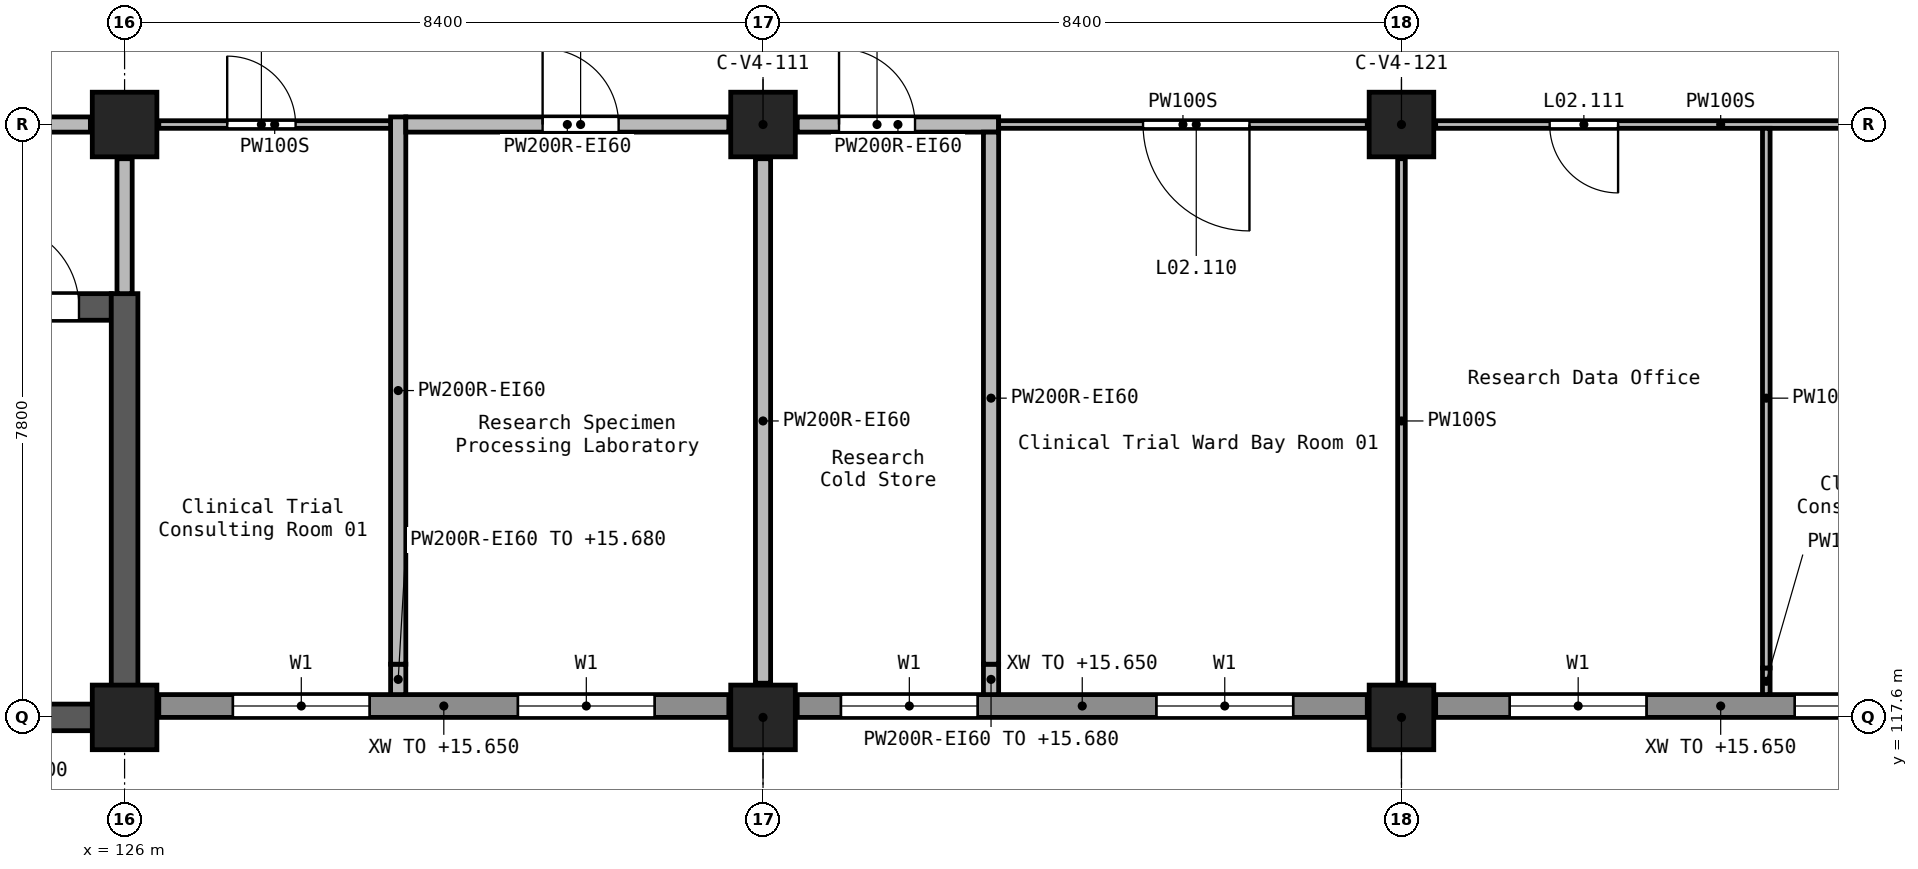
"""IFC4 building model, lengths in metres.
Left out: names, types, materials, properties, quantities, classifications, styles, units other than length and angle.
Written with IfcOpenShell. Run it as: python <this file> out.ifc"""

import sys

from ifc_helpers import new_model, si_unit, direction, frame, frame_2d, origin, origin_2d, place, context, subcontext, project, spatial, rectangle, extrude, element, fill, save


model = new_model("IFC4")
c1 = context("Model", 3, precision=1e-05, world=origin(), true_north=direction((0.0, 1.0)))
c2 = subcontext(c1, "Body", "Model", "MODEL_VIEW")
j1 = project(units=[si_unit("LENGTHUNIT", "METRE"), si_unit("PLANEANGLEUNIT", "RADIAN")], contexts=[c1])
p1 = place(None, origin())
s1 = spatial("IfcSite", under=j1, at=p1, CompositionType="ELEMENT")
p2 = place(p1, origin())
s2 = spatial("IfcBuilding", under=s1, at=p2, CompositionType="ELEMENT")
p3 = place(p2, frame((0.0, 0.0, 12.6)))
s3 = spatial("IfcBuildingStorey", under=s2, at=p3, CompositionType="ELEMENT", Elevation=12.6)
for number, where, z_axis, x_axis in (
    (1, (126.0, 117.6, 0.0), (0.0, 0.0, 1.0), (1.0, 0.0, 0.0)),
    (2, (126.0, 125.4, 0.0), (0.0, 0.0, 1.0), (1.0, 0.0, 0.0)),
    (3, (134.4, 117.6, 0.0), (0.0, 0.0, 1.0), (1.0, 0.0, 0.0)),
    (4, (134.4, 125.4, 0.0), (0.0, 0.0, 1.0), (1.0, 0.0, 0.0)),
    (5, (142.8, 117.6, 0.0), (0.0, 0.0, 1.0), (1.0, 0.0, 0.0)),
    (6, (142.8, 125.4, 0.0), (0.0, 0.0, 1.0), (1.0, 0.0, 0.0)),
):
    element("IfcColumn", number, at=place(p3, frame(where, z_axis=z_axis, x_axis=x_axis)), inside=s3, PredefinedType="COLUMN", context=c2, shape_type="SweptSolid", body=[
        extrude(rectangle(XDim=0.85, YDim=0.85, at=origin_2d()), origin(), (0.0, 0.0, 1.0), 4.2),
    ])
p4 = place(p3, frame((117.425, 123.0, 0.0), z_axis=(0.0, 0.0, 1.0), x_axis=(1.0, 0.0, 0.0)))
e7 = element("IfcWall", 7, at=p4, inside=s3, PredefinedType="SHEAR", context=c2, shape_type="SweptSolid", body=[
    extrude(rectangle(XDim=8.4, YDim=0.35, at=frame_2d((4.2, 0.0))), origin(), (0.0, 0.0, 1.0), 4.2),
])
p5 = place(p4, frame((6.875, 0.0, 0.0)))
e8 = element("IfcOpeningElement", 8, at=p5, cuts=e7, PredefinedType="OPENING", context=c2, shape_type="SweptSolid", body=[
    extrude(rectangle(XDim=1.1, YDim=2.1, at=frame_2d((0.55, 1.05))), frame((0.0, 0.185, 0.0), z_axis=(0.0, -1.0, 0.0), x_axis=(1.0, 0.0, 0.0)), (0.0, 0.0, 1.0), 0.37),
])
p6 = place(p3, frame((117.775, 117.6, 0.0), z_axis=(0.0, 0.0, 1.0), x_axis=(1.0, 0.0, 0.0)))
e9 = element("IfcWall", 9, at=p6, inside=s3, PredefinedType="SHEAR", context=c2, shape_type="SweptSolid", body=[
    extrude(rectangle(XDim=8.05, YDim=0.35, at=frame_2d((4.025, 0.0))), origin(), (0.0, 0.0, 1.0), 4.2),
])
p7 = place(p3, frame((126.0, 117.425, 0.0), z_axis=(0.0, 0.0, 1.0), x_axis=(0.0, 1.0, 0.0)))
e10 = element("IfcWall", 10, at=p7, inside=s3, PredefinedType="SHEAR", context=c2, shape_type="SweptSolid", body=[
    extrude(rectangle(XDim=5.75, YDim=0.35, at=frame_2d((2.875, 0.0))), origin(), (0.0, 0.0, 1.0), 4.2),
])
p8 = place(p3, frame((126.45, 117.75, 0.0), z_axis=(0.0, 0.0, 1.0), x_axis=(1.0, 0.0, 0.0)))
e11 = element("IfcWall", 11, at=p8, inside=s3, PredefinedType="STANDARD", context=c2, shape_type="SweptSolid", body=[
    extrude(rectangle(XDim=7.5, YDim=0.3, at=frame_2d((3.75, 0.0))), origin(), (0.0, 0.0, 1.0), 3.05),
])
p9 = place(p8, frame((0.975, 0.0, 0.9)))
e12 = element("IfcOpeningElement", 12, at=p9, cuts=e11, PredefinedType="OPENING", context=c2, shape_type="SweptSolid", body=[
    extrude(rectangle(XDim=1.8, YDim=1.5, at=frame_2d((0.9, 0.75))), frame((0.0, 0.16, 0.0), z_axis=(0.0, -1.0, 0.0), x_axis=(1.0, 0.0, 0.0)), (0.0, 0.0, 1.0), 0.32),
])
p10 = place(p8, frame((4.725, 0.0, 0.9)))
e13 = element("IfcOpeningElement", 13, at=p10, cuts=e11, PredefinedType="OPENING", context=c2, shape_type="SweptSolid", body=[
    extrude(rectangle(XDim=1.8, YDim=1.5, at=frame_2d((0.9, 0.75))), frame((0.0, 0.16, 0.0), z_axis=(0.0, -1.0, 0.0), x_axis=(1.0, 0.0, 0.0)), (0.0, 0.0, 1.0), 0.32),
])
p11 = place(p3, frame((134.85, 117.75, 0.0), z_axis=(0.0, 0.0, 1.0), x_axis=(1.0, 0.0, 0.0)))
e14 = element("IfcWall", 14, at=p11, inside=s3, PredefinedType="STANDARD", context=c2, shape_type="SweptSolid", body=[
    extrude(rectangle(XDim=7.5, YDim=0.3, at=frame_2d((3.75, 0.0))), origin(), (0.0, 0.0, 1.0), 3.05),
])
p12 = place(p11, frame((0.575, 0.0, 0.9)))
e15 = element("IfcOpeningElement", 15, at=p12, cuts=e14, PredefinedType="OPENING", context=c2, shape_type="SweptSolid", body=[
    extrude(rectangle(XDim=1.8, YDim=1.5, at=frame_2d((0.9, 0.75))), frame((0.0, 0.16, 0.0), z_axis=(0.0, -1.0, 0.0), x_axis=(1.0, 0.0, 0.0)), (0.0, 0.0, 1.0), 0.32),
])
p13 = place(p11, frame((4.725, 0.0, 0.9)))
e16 = element("IfcOpeningElement", 16, at=p13, cuts=e14, PredefinedType="OPENING", context=c2, shape_type="SweptSolid", body=[
    extrude(rectangle(XDim=1.8, YDim=1.5, at=frame_2d((0.9, 0.75))), frame((0.0, 0.16, 0.0), z_axis=(0.0, -1.0, 0.0), x_axis=(1.0, 0.0, 0.0)), (0.0, 0.0, 1.0), 0.32),
])
p14 = place(p3, frame((143.25, 117.75, 0.0), z_axis=(0.0, 0.0, 1.0), x_axis=(1.0, 0.0, 0.0)))
e17 = element("IfcWall", 17, at=p14, inside=s3, PredefinedType="STANDARD", context=c2, shape_type="SweptSolid", body=[
    extrude(rectangle(XDim=7.5, YDim=0.3, at=frame_2d((3.75, 0.0))), origin(), (0.0, 0.0, 1.0), 3.05),
])
p15 = place(p14, frame((0.975, 0.0, 0.9)))
e18 = element("IfcOpeningElement", 18, at=p15, cuts=e17, PredefinedType="OPENING", context=c2, shape_type="SweptSolid", body=[
    extrude(rectangle(XDim=1.8, YDim=1.5, at=frame_2d((0.9, 0.75))), frame((0.0, 0.16, 0.0), z_axis=(0.0, -1.0, 0.0), x_axis=(1.0, 0.0, 0.0)), (0.0, 0.0, 1.0), 0.32),
])
p16 = place(p14, frame((4.725, 0.0, 0.9)))
e19 = element("IfcOpeningElement", 19, at=p16, cuts=e17, PredefinedType="OPENING", context=c2, shape_type="SweptSolid", body=[
    extrude(rectangle(XDim=1.8, YDim=1.5, at=frame_2d((0.9, 0.75))), frame((0.0, 0.16, 0.0), z_axis=(0.0, -1.0, 0.0), x_axis=(1.0, 0.0, 0.0)), (0.0, 0.0, 1.0), 0.32),
])
p17 = place(p3, frame((118.05, 125.4, 0.0), z_axis=(0.0, 0.0, 1.0), x_axis=(1.0, 0.0, 0.0)))
e20 = element("IfcWall", 20, at=p17, inside=s3, PredefinedType="SOLIDWALL", context=c2, shape_type="SweptSolid", body=[
    extrude(rectangle(XDim=7.5, YDim=0.2, at=frame_2d((3.75, 0.0))), origin(), (0.0, 0.0, 1.0), 3.85),
])
p18 = place(p17, frame((3.2, 0.0, 0.0)))
e21 = element("IfcOpeningElement", 21, at=p18, cuts=e20, PredefinedType="OPENING", context=c2, shape_type="SweptSolid", body=[
    extrude(rectangle(XDim=1.1, YDim=2.1, at=frame_2d((0.55, 1.05))), frame((0.0, 0.11, 0.0), z_axis=(0.0, -1.0, 0.0), x_axis=(1.0, 0.0, 0.0)), (0.0, 0.0, 1.0), 0.22),
])
p19 = place(p3, frame((129.6, 117.9, 0.0), z_axis=(0.0, 0.0, 1.0), x_axis=(0.0, 1.0, 0.0)))
e22 = element("IfcWall", 22, at=p19, inside=s3, PredefinedType="SOLIDWALL", context=c2, shape_type="SweptSolid", body=[
    extrude(rectangle(XDim=0.4, YDim=0.2, at=frame_2d((0.2, 0.0))), origin(), (0.0, 0.0, 1.0), 3.08),
])
p20 = place(p3, frame((129.6, 118.3, 0.0), z_axis=(0.0, 0.0, 1.0), x_axis=(0.0, 1.0, 0.0)))
e23 = element("IfcWall", 23, at=p20, inside=s3, PredefinedType="SOLIDWALL", context=c2, shape_type="SweptSolid", body=[
    extrude(rectangle(XDim=7.2, YDim=0.2, at=frame_2d((3.6, 0.0))), origin(), (0.0, 0.0, 1.0), 3.85),
])
p21 = place(p3, frame((129.7, 125.4, 0.0), z_axis=(0.0, 0.0, 1.0), x_axis=(1.0, 0.0, 0.0)))
e24 = element("IfcWall", 24, at=p21, inside=s3, PredefinedType="SOLIDWALL", context=c2, shape_type="SweptSolid", body=[
    extrude(rectangle(XDim=4.25, YDim=0.2, at=frame_2d((2.125, 0.0))), origin(), (0.0, 0.0, 1.0), 3.85),
])
p22 = place(p21, frame((1.8, 0.0, 0.0)))
e25 = element("IfcOpeningElement", 25, at=p22, cuts=e24, PredefinedType="OPENING", context=c2, shape_type="SweptSolid", body=[
    extrude(rectangle(XDim=1.0, YDim=2.1, at=frame_2d((0.5, 1.05))), frame((0.0, 0.11, 0.0), z_axis=(0.0, -1.0, 0.0), x_axis=(1.0, 0.0, 0.0)), (0.0, 0.0, 1.0), 0.22),
])
p23 = place(p3, frame((134.85, 125.4, 0.0), z_axis=(0.0, 0.0, 1.0), x_axis=(1.0, 0.0, 0.0)))
e26 = element("IfcWall", 26, at=p23, inside=s3, PredefinedType="SOLIDWALL", context=c2, shape_type="SweptSolid", body=[
    extrude(rectangle(XDim=2.65, YDim=0.2, at=frame_2d((1.325, 0.0))), origin(), (0.0, 0.0, 1.0), 3.85),
])
p24 = place(p23, frame((0.55, 0.0, 0.0)))
e27 = element("IfcOpeningElement", 27, at=p24, cuts=e26, PredefinedType="OPENING", context=c2, shape_type="SweptSolid", body=[
    extrude(rectangle(XDim=1.0, YDim=2.1, at=frame_2d((0.5, 1.05))), frame((0.0, 0.11, 0.0), z_axis=(0.0, -1.0, 0.0), x_axis=(1.0, 0.0, 0.0)), (0.0, 0.0, 1.0), 0.22),
])
p25 = place(p3, frame((134.4, 118.05, 0.0), z_axis=(0.0, 0.0, 1.0), x_axis=(0.0, 1.0, 0.0)))
e28 = element("IfcWall", 28, at=p25, inside=s3, PredefinedType="SOLIDWALL", context=c2, shape_type="SweptSolid", body=[
    extrude(rectangle(XDim=6.9, YDim=0.2, at=frame_2d((3.45, 0.0))), origin(), (0.0, 0.0, 1.0), 3.85),
])
p26 = place(p3, frame((137.4, 117.9, 0.0), z_axis=(0.0, 0.0, 1.0), x_axis=(0.0, 1.0, 0.0)))
e29 = element("IfcWall", 29, at=p26, inside=s3, PredefinedType="SOLIDWALL", context=c2, shape_type="SweptSolid", body=[
    extrude(rectangle(XDim=0.4, YDim=0.2, at=frame_2d((0.2, 0.0))), origin(), (0.0, 0.0, 1.0), 3.08),
])
p27 = place(p3, frame((137.4, 118.3, 0.0), z_axis=(0.0, 0.0, 1.0), x_axis=(0.0, 1.0, 0.0)))
e30 = element("IfcWall", 30, at=p27, inside=s3, PredefinedType="SOLIDWALL", context=c2, shape_type="SweptSolid", body=[
    extrude(rectangle(XDim=7.0, YDim=0.2, at=frame_2d((3.5, 0.0))), origin(), (0.0, 0.0, 1.0), 3.85),
])
p28 = place(p3, frame((126.0, 123.175, 0.0), z_axis=(0.0, 0.0, 1.0), x_axis=(0.0, 1.0, 0.0)))
e31 = element("IfcWall", 31, at=p28, inside=s3, PredefinedType="SOLIDWALL", context=c2, shape_type="SweptSolid", body=[
    extrude(rectangle(XDim=1.775, YDim=0.2, at=frame_2d((0.887, 0.0))), origin(), (0.0, 0.0, 1.0), 3.85),
])
p29 = place(p3, frame((150.75, 125.4, 0.0), z_axis=(0.0, 0.0, 1.0), x_axis=(-1.0, 0.0, 0.0)))
e32 = element("IfcWall", 32, at=p29, inside=s3, PredefinedType="PARTITIONING", context=c2, shape_type="SweptSolid", body=[
    extrude(rectangle(XDim=7.5, YDim=0.1, at=frame_2d((3.75, 0.0))), origin(), (0.0, 0.0, 1.0), 3.85),
])
p30 = place(p29, frame((5.1, 0.0, 0.0)))
e33 = element("IfcOpeningElement", 33, at=p30, cuts=e32, PredefinedType="OPENING", context=c2, shape_type="SweptSolid", body=[
    extrude(rectangle(XDim=0.9, YDim=2.1, at=frame_2d((0.45, 1.05))), frame((0.0, 0.06, 0.0), z_axis=(0.0, -1.0, 0.0), x_axis=(1.0, 0.0, 0.0)), (0.0, 0.0, 1.0), 0.12),
])
p31 = place(p29, frame((0.9, 0.0, 0.0)))
e34 = element("IfcOpeningElement", 34, at=p31, cuts=e32, PredefinedType="OPENING", context=c2, shape_type="SweptSolid", body=[
    extrude(rectangle(XDim=0.9, YDim=2.1, at=frame_2d((0.45, 1.05))), frame((0.0, 0.06, 0.0), z_axis=(0.0, -1.0, 0.0), x_axis=(1.0, 0.0, 0.0)), (0.0, 0.0, 1.0), 0.12),
])
p32 = place(p3, frame((142.35, 125.4, 0.0), z_axis=(0.0, 0.0, 1.0), x_axis=(-1.0, 0.0, 0.0)))
e35 = element("IfcWall", 35, at=p32, inside=s3, PredefinedType="PARTITIONING", context=c2, shape_type="SweptSolid", body=[
    extrude(rectangle(XDim=4.85, YDim=0.1, at=frame_2d((2.425, 0.0))), origin(), (0.0, 0.0, 1.0), 3.85),
])
p33 = place(p32, frame((1.55, 0.0, 0.0)))
e36 = element("IfcOpeningElement", 36, at=p33, cuts=e35, PredefinedType="OPENING", context=c2, shape_type="SweptSolid", body=[
    extrude(rectangle(XDim=1.4, YDim=2.1, at=frame_2d((0.7, 1.05))), frame((0.0, 0.06, 0.0), z_axis=(0.0, -1.0, 0.0), x_axis=(1.0, 0.0, 0.0)), (0.0, 0.0, 1.0), 0.12),
])
p34 = place(p3, frame((142.8, 118.05, 0.0), z_axis=(0.0, 0.0, 1.0), x_axis=(0.0, 1.0, 0.0)))
e37 = element("IfcWall", 37, at=p34, inside=s3, PredefinedType="PARTITIONING", context=c2, shape_type="SweptSolid", body=[
    extrude(rectangle(XDim=6.9, YDim=0.1, at=frame_2d((3.45, 0.0))), origin(), (0.0, 0.0, 1.0), 3.85),
])
p35 = place(p3, frame((147.6, 117.9, 0.0), z_axis=(0.0, 0.0, 1.0), x_axis=(0.0, 1.0, 0.0)))
e38 = element("IfcWall", 38, at=p35, inside=s3, PredefinedType="PARTITIONING", context=c2, shape_type="SweptSolid", body=[
    extrude(rectangle(XDim=0.35, YDim=0.1, at=frame_2d((0.175, 0.0))), origin(), (0.0, 0.0, 1.0), 3.08),
])
p36 = place(p3, frame((147.6, 118.25, 0.0), z_axis=(0.0, 0.0, 1.0), x_axis=(0.0, 1.0, 0.0)))
e39 = element("IfcWall", 39, at=p36, inside=s3, PredefinedType="PARTITIONING", context=c2, shape_type="SweptSolid", body=[
    extrude(rectangle(XDim=7.1, YDim=0.1, at=frame_2d((3.55, 0.0))), origin(), (0.0, 0.0, 1.0), 3.85),
])
p37 = place(p3, frame((126.45, 125.4, 0.0), z_axis=(0.0, 0.0, 1.0), x_axis=(1.0, 0.0, 0.0)))
e40 = element("IfcWall", 40, at=p37, inside=s3, PredefinedType="PARTITIONING", context=c2, shape_type="SweptSolid", body=[
    extrude(rectangle(XDim=3.05, YDim=0.1, at=frame_2d((1.525, 0.0))), origin(), (0.0, 0.0, 1.0), 3.85),
])
p38 = place(p37, frame((0.9, 0.0, 0.0)))
e41 = element("IfcOpeningElement", 41, at=p38, cuts=e40, PredefinedType="OPENING", context=c2, shape_type="SweptSolid", body=[
    extrude(rectangle(XDim=0.9, YDim=2.1, at=frame_2d((0.45, 1.05))), frame((0.0, 0.06, 0.0), z_axis=(0.0, -1.0, 0.0), x_axis=(1.0, 0.0, 0.0)), (0.0, 0.0, 1.0), 0.12),
])
p39 = place(p9, origin())
e42 = element("IfcWindow", 42, at=p39, inside=s3, PartitioningType="SINGLE_PANEL", PredefinedType="WINDOW", context=c2, shape_type="SweptSolid", body=[
    extrude(rectangle(XDim=1.8, YDim=1.5, at=frame_2d((0.9, 0.75))), frame((0.0, 0.03, 0.0), z_axis=(0.0, -1.0, 0.0), x_axis=(1.0, 0.0, 0.0)), (0.0, 0.0, 1.0), 0.06),
])
fill(e12, e42)
p40 = place(p10, origin())
e43 = element("IfcWindow", 43, at=p40, inside=s3, PartitioningType="SINGLE_PANEL", PredefinedType="WINDOW", context=c2, shape_type="SweptSolid", body=[
    extrude(rectangle(XDim=1.8, YDim=1.5, at=frame_2d((0.9, 0.75))), frame((0.0, 0.03, 0.0), z_axis=(0.0, -1.0, 0.0), x_axis=(1.0, 0.0, 0.0)), (0.0, 0.0, 1.0), 0.06),
])
fill(e13, e43)
p41 = place(p12, origin())
e44 = element("IfcWindow", 44, at=p41, inside=s3, PartitioningType="SINGLE_PANEL", PredefinedType="WINDOW", context=c2, shape_type="SweptSolid", body=[
    extrude(rectangle(XDim=1.8, YDim=1.5, at=frame_2d((0.9, 0.75))), frame((0.0, 0.03, 0.0), z_axis=(0.0, -1.0, 0.0), x_axis=(1.0, 0.0, 0.0)), (0.0, 0.0, 1.0), 0.06),
])
fill(e15, e44)
p42 = place(p13, origin())
e45 = element("IfcWindow", 45, at=p42, inside=s3, PartitioningType="SINGLE_PANEL", PredefinedType="WINDOW", context=c2, shape_type="SweptSolid", body=[
    extrude(rectangle(XDim=1.8, YDim=1.5, at=frame_2d((0.9, 0.75))), frame((0.0, 0.03, 0.0), z_axis=(0.0, -1.0, 0.0), x_axis=(1.0, 0.0, 0.0)), (0.0, 0.0, 1.0), 0.06),
])
fill(e16, e45)
p43 = place(p15, origin())
e46 = element("IfcWindow", 46, at=p43, inside=s3, PartitioningType="SINGLE_PANEL", PredefinedType="WINDOW", context=c2, shape_type="SweptSolid", body=[
    extrude(rectangle(XDim=1.8, YDim=1.5, at=frame_2d((0.9, 0.75))), frame((0.0, 0.03, 0.0), z_axis=(0.0, -1.0, 0.0), x_axis=(1.0, 0.0, 0.0)), (0.0, 0.0, 1.0), 0.06),
])
fill(e18, e46)
p44 = place(p16, origin())
e47 = element("IfcWindow", 47, at=p44, inside=s3, PartitioningType="SINGLE_PANEL", PredefinedType="WINDOW", context=c2, shape_type="SweptSolid", body=[
    extrude(rectangle(XDim=1.8, YDim=1.5, at=frame_2d((0.9, 0.75))), frame((0.0, 0.03, 0.0), z_axis=(0.0, -1.0, 0.0), x_axis=(1.0, 0.0, 0.0)), (0.0, 0.0, 1.0), 0.06),
])
fill(e19, e47)
p45 = place(p5, frame((1.1, 0.0, 0.0), z_axis=(0.0, 0.0, 1.0), x_axis=(-1.0, 0.0, 0.0)))
e48 = element("IfcDoor", 48, at=p45, inside=s3, OperationType="SINGLE_SWING_LEFT", PredefinedType="DOOR", context=c2, shape_type="SweptSolid", body=[
    extrude(rectangle(XDim=1.1, YDim=2.1, at=frame_2d((0.55, 1.05))), frame((0.0, 0.025, 0.0), z_axis=(0.0, -1.0, 0.0), x_axis=(1.0, 0.0, 0.0)), (0.0, 0.0, 1.0), 0.05),
])
fill(e8, e48)
p46 = place(p38, frame((0.9, 0.0, 0.0), z_axis=(0.0, 0.0, 1.0), x_axis=(-1.0, 0.0, 0.0)))
e49 = element("IfcDoor", 49, at=p46, inside=s3, OperationType="SINGLE_SWING_RIGHT", PredefinedType="DOOR", context=c2, shape_type="SweptSolid", body=[
    extrude(rectangle(XDim=0.9, YDim=2.1, at=frame_2d((0.45, 1.05))), frame((0.0, 0.025, 0.0), z_axis=(0.0, -1.0, 0.0), x_axis=(1.0, 0.0, 0.0)), (0.0, 0.0, 1.0), 0.05),
])
fill(e41, e49)
p47 = place(p22, frame((1.0, 0.0, 0.0), z_axis=(0.0, 0.0, 1.0), x_axis=(-1.0, 0.0, 0.0)))
e50 = element("IfcDoor", 50, at=p47, inside=s3, OperationType="SINGLE_SWING_LEFT", PredefinedType="DOOR", context=c2, shape_type="SweptSolid", body=[
    extrude(rectangle(XDim=1.0, YDim=2.1, at=frame_2d((0.5, 1.05))), frame((0.0, 0.025, 0.0), z_axis=(0.0, -1.0, 0.0), x_axis=(1.0, 0.0, 0.0)), (0.0, 0.0, 1.0), 0.05),
])
fill(e25, e50)
p48 = place(p24, frame((1.0, 0.0, 0.0), z_axis=(0.0, 0.0, 1.0), x_axis=(-1.0, 0.0, 0.0)))
e51 = element("IfcDoor", 51, at=p48, inside=s3, OperationType="SINGLE_SWING_RIGHT", PredefinedType="DOOR", context=c2, shape_type="SweptSolid", body=[
    extrude(rectangle(XDim=1.0, YDim=2.1, at=frame_2d((0.5, 1.05))), frame((0.0, 0.025, 0.0), z_axis=(0.0, -1.0, 0.0), x_axis=(1.0, 0.0, 0.0)), (0.0, 0.0, 1.0), 0.05),
])
fill(e27, e51)
p49 = place(p33, origin())
e52 = element("IfcDoor", 52, at=p49, inside=s3, OperationType="DOUBLE_DOOR_SINGLE_SWING", PredefinedType="DOOR", context=c2, shape_type="SweptSolid", body=[
    extrude(rectangle(XDim=1.4, YDim=2.1, at=frame_2d((0.7, 1.05))), frame((0.0, 0.025, 0.0), z_axis=(0.0, -1.0, 0.0), x_axis=(1.0, 0.0, 0.0)), (0.0, 0.0, 1.0), 0.05),
])
fill(e36, e52)
p50 = place(p30, origin())
e53 = element("IfcDoor", 53, at=p50, inside=s3, OperationType="SINGLE_SWING_RIGHT", PredefinedType="DOOR", context=c2, shape_type="SweptSolid", body=[
    extrude(rectangle(XDim=0.9, YDim=2.1, at=frame_2d((0.45, 1.05))), frame((0.0, 0.025, 0.0), z_axis=(0.0, -1.0, 0.0), x_axis=(1.0, 0.0, 0.0)), (0.0, 0.0, 1.0), 0.05),
])
fill(e33, e53)
save(model, sys.argv[1])
